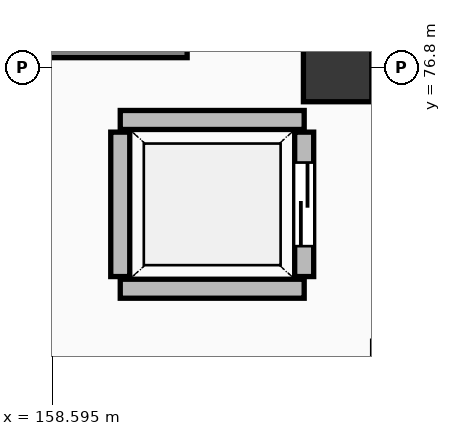
"""IFC4 building model, lengths in metres.
Left out: names, types, materials, properties, quantities, classifications, styles, units other than length and angle.
Written with IfcOpenShell. Run it as: python <this file> out.ifc"""

import sys

from ifc_helpers import new_model, si_unit, direction, frame, frame_2d, origin, origin_2d, place, context, subcontext, project, spatial, rectangle, extrude, element, fill, save


model = new_model("IFC4")
c1 = context("Model", 3, precision=1e-05, world=origin(), true_north=direction((0.0, 1.0)))
c2 = subcontext(c1, "Body", "Model", "MODEL_VIEW")
j1 = project(units=[si_unit("LENGTHUNIT", "METRE"), si_unit("PLANEANGLEUNIT", "RADIAN")], contexts=[c1])
p1 = place(None, origin())
s1 = spatial("IfcSite", under=j1, at=p1, CompositionType="ELEMENT")
p2 = place(p1, origin())
s2 = spatial("IfcBuilding", under=s1, at=p2, CompositionType="ELEMENT")
p3 = place(p2, frame((0.0, 0.0, 16.2)))
s3 = spatial("IfcBuildingStorey", under=s2, at=p3, CompositionType="ELEMENT", Elevation=16.2)
p4 = place(p3, frame((162.35, 76.8, 0.0), z_axis=(0.0, 0.0, 1.0), x_axis=(1.0, 0.0, 0.0)))
e1 = element("IfcColumn", 1, at=p4, inside=s3, PredefinedType="COLUMN", context=c2, shape_type="SweptSolid", body=[
    extrude(rectangle(XDim=0.9, YDim=0.9, at=origin_2d()), origin(), (0.0, 0.0, 1.0), 4.8),
])
p5 = place(p3, frame((156.7, 77.18, 0.0), z_axis=(0.0, 0.0, 1.0), x_axis=(1.0, 0.0, 0.0)))
e2 = element("IfcWall", 2, at=p5, inside=s3, PredefinedType="SHEAR", context=c2, shape_type="SweptSolid", body=[
    extrude(rectangle(XDim=3.67, YDim=0.5, at=frame_2d((1.835, 0.0))), origin(), (0.0, 0.0, 1.0), 4.54),
])
for number, where, z_axis, x_axis in (
    (3, (159.49, 73.89, 0.0), (0.0, 0.0, 1.0), (1.0, 0.0, 0.0)),
    (4, (159.49, 76.11, 0.0), (0.0, 0.0, 1.0), (1.0, 0.0, 0.0)),
):
    element("IfcWall", number, at=place(p3, frame(where, z_axis=z_axis, x_axis=x_axis)), inside=s3, PredefinedType="SOLIDWALL", context=c2, shape_type="SweptSolid", body=[
        extrude(rectangle(XDim=2.42, YDim=0.25, at=frame_2d((1.21, 0.0))), origin(), (0.0, 0.0, 1.0), 3.132),
    ])
p6 = place(p3, frame((159.49, 74.05, 0.0), z_axis=(0.0, 0.0, 1.0), x_axis=(0.0, 1.0, 0.0)))
e5 = element("IfcWall", 5, at=p6, inside=s3, PredefinedType="SOLIDWALL", context=c2, shape_type="SweptSolid", body=[
    extrude(rectangle(XDim=1.9, YDim=0.25, at=frame_2d((0.95, 0.0))), origin(), (0.0, 0.0, 1.0), 4.54),
])
p7 = place(p3, frame((161.91, 74.05, 0.0), z_axis=(0.0, 0.0, 1.0), x_axis=(0.0, 1.0, 0.0)))
e6 = element("IfcWall", 6, at=p7, inside=s3, PredefinedType="SOLIDWALL", context=c2, shape_type="SweptSolid", body=[
    extrude(rectangle(XDim=1.9, YDim=0.25, at=frame_2d((0.95, 0.0))), origin(), (0.0, 0.0, 1.0), 3.132),
])
p8 = place(p7, frame((0.4, 0.0, 0.0)))
e7 = element("IfcOpeningElement", 7, at=p8, cuts=e6, PredefinedType="OPENING", context=c2, shape_type="SweptSolid", body=[
    extrude(rectangle(XDim=1.1, YDim=2.2, at=frame_2d((0.55, 1.1))), frame((0.0, 0.137, 0.0), z_axis=(0.0, -1.0, 0.0), x_axis=(1.0, 0.0, 0.0)), (0.0, 0.0, 1.0), 0.274),
])
p9 = place(p8, origin())
e8 = element("IfcDoor", 8, at=p9, inside=s3, OperationType="SLIDING_TO_LEFT", PredefinedType="DOOR", context=c2, shape_type="SweptSolid", body=[
    extrude(rectangle(XDim=1.1, YDim=2.2, at=frame_2d((0.55, 1.1))), frame((0.0, 0.025, 0.0), z_axis=(0.0, -1.0, 0.0), x_axis=(1.0, 0.0, 0.0)), (0.0, 0.0, 1.0), 0.05),
])
fill(e7, e8)
save(model, sys.argv[1])
